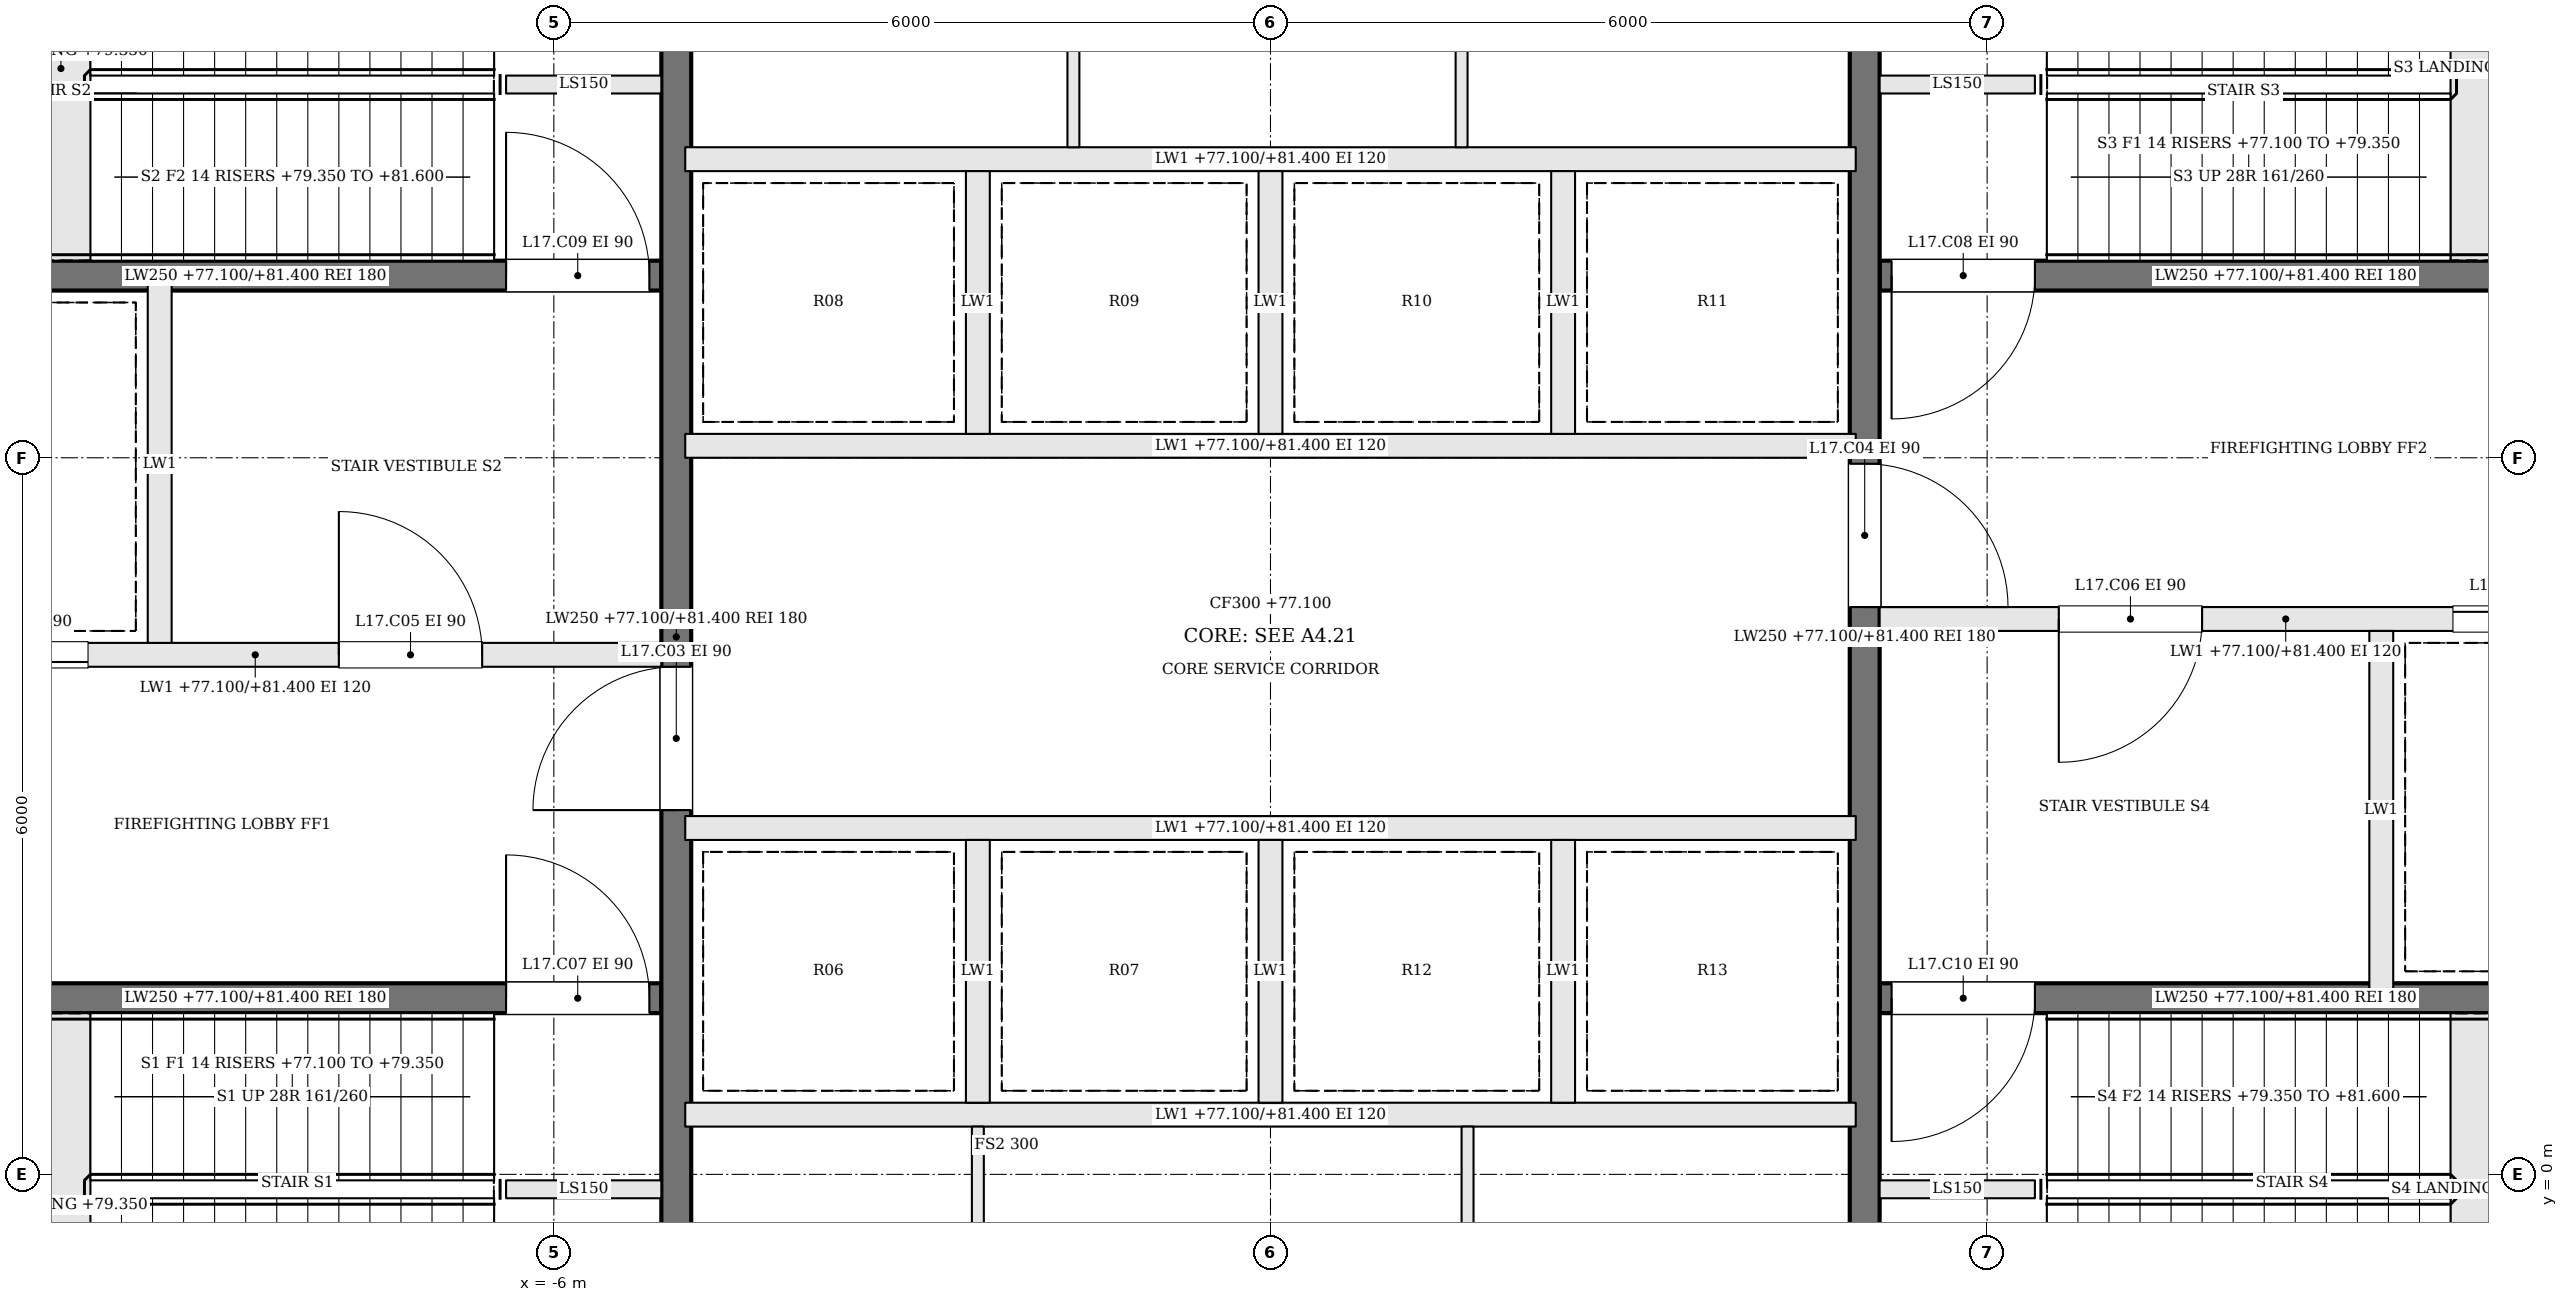
"""IFC4 building model, lengths in metres.
Left out: names, types, materials, properties, quantities, classifications, styles, units other than length and angle.
Written with IfcOpenShell. Run it as: python <this file> out.ifc"""

import sys

from ifc_helpers import new_model, si_unit, direction, frame, frame_2d, origin, place, context, subcontext, project, spatial, rectangle, extrude, element, fill, save


model = new_model("IFC4")
c1 = context("Model", 3, precision=1e-05, world=origin(), true_north=direction((0.0, 1.0)))
c2 = subcontext(c1, "Body", "Model", "MODEL_VIEW")
j1 = project(units=[si_unit("LENGTHUNIT", "METRE"), si_unit("PLANEANGLEUNIT", "RADIAN")], contexts=[c1])
p1 = place(None, origin())
s1 = spatial("IfcSite", under=j1, at=p1, CompositionType="ELEMENT")
p2 = place(p1, origin())
s2 = spatial("IfcBuilding", under=s1, at=p2, CompositionType="ELEMENT")
p3 = place(p2, frame((0.0, 0.0, 77.1)))
s3 = spatial("IfcBuildingStorey", under=s2, at=p3, CompositionType="ELEMENT", Elevation=77.1)
for number, where, z_axis, x_axis in (
    (1, (-6.4, -0.125, 0.0), (0.0, 0.0, 1.0), (1.0, 0.0, 0.0)),
    (2, (6.4, 9.125, 0.0), (0.0, 0.0, 1.0), (-1.0, 0.0, 0.0)),
    (3, (-6.4, 9.125, 0.0), (0.0, 0.0, 1.0), (1.0, 0.0, 0.0)),
    (4, (6.4, -0.125, 0.0), (0.0, 0.0, 1.0), (-1.0, 0.0, 0.0)),
):
    element("IfcWall", number, at=place(p3, frame(where, z_axis=z_axis, x_axis=x_axis)), inside=s3, PredefinedType="SOLIDWALL", context=c2, shape_type="SweptSolid", body=[
        extrude(rectangle(XDim=1.3, YDim=0.15, at=frame_2d((0.65, 0.0))), origin(), (0.0, 0.0, 1.0), 4.3),
    ])
p4 = place(p3, frame((-11.9, 1.475, 0.0), z_axis=(0.0, 0.0, 1.0), x_axis=(1.0, 0.0, 0.0)))
e5 = element("IfcWall", 5, at=p4, inside=s3, PredefinedType="SOLIDWALL", context=c2, shape_type="SweptSolid", body=[
    extrude(rectangle(XDim=6.8, YDim=0.25, at=frame_2d((3.4, 0.0))), origin(), (0.0, 0.0, 1.0), 4.3),
])
p5 = place(p4, frame((5.5, 0.0, 0.0)))
e6 = element("IfcOpeningElement", 6, at=p5, cuts=e5, PredefinedType="OPENING", context=c2, shape_type="SweptSolid", body=[
    extrude(rectangle(XDim=1.2, YDim=2.1, at=frame_2d((0.6, 1.05))), frame((0.0, 0.135, 0.0), z_axis=(0.0, -1.0, 0.0), x_axis=(1.0, 0.0, 0.0)), (0.0, 0.0, 1.0), 0.27),
])
p6 = place(p3, frame((11.9, 7.525, 0.0), z_axis=(0.0, 0.0, 1.0), x_axis=(-1.0, 0.0, 0.0)))
e7 = element("IfcWall", 7, at=p6, inside=s3, PredefinedType="SOLIDWALL", context=c2, shape_type="SweptSolid", body=[
    extrude(rectangle(XDim=6.8, YDim=0.25, at=frame_2d((3.4, 0.0))), origin(), (0.0, 0.0, 1.0), 4.3),
])
p7 = place(p6, frame((5.5, 0.0, 0.0)))
e8 = element("IfcOpeningElement", 8, at=p7, cuts=e7, PredefinedType="OPENING", context=c2, shape_type="SweptSolid", body=[
    extrude(rectangle(XDim=1.2, YDim=2.1, at=frame_2d((0.6, 1.05))), frame((0.0, 0.135, 0.0), z_axis=(0.0, -1.0, 0.0), x_axis=(1.0, 0.0, 0.0)), (0.0, 0.0, 1.0), 0.27),
])
p8 = place(p3, frame((-11.9, 4.35, 0.0), z_axis=(0.0, 0.0, 1.0), x_axis=(1.0, 0.0, 0.0)))
e9 = element("IfcWall", 9, at=p8, inside=s3, PredefinedType="SOLIDWALL", context=c2, shape_type="SweptSolid", body=[
    extrude(rectangle(XDim=6.8, YDim=0.2, at=frame_2d((3.4, 0.0))), origin(), (0.0, 0.0, 1.0), 4.3),
])
p9 = place(p8, frame((4.1, 0.0, 0.0)))
e10 = element("IfcOpeningElement", 10, at=p9, cuts=e9, PredefinedType="OPENING", context=c2, shape_type="SweptSolid", body=[
    extrude(rectangle(XDim=1.2, YDim=2.1, at=frame_2d((0.6, 1.05))), frame((0.0, 0.11, 0.0), z_axis=(0.0, -1.0, 0.0), x_axis=(1.0, 0.0, 0.0)), (0.0, 0.0, 1.0), 0.22),
])
p10 = place(p8, frame((0.8, 0.0, 0.0)))
e11 = element("IfcOpeningElement", 11, at=p10, cuts=e9, PredefinedType="OPENING", context=c2, shape_type="SweptSolid", body=[
    extrude(rectangle(XDim=1.2, YDim=2.1, at=frame_2d((0.6, 1.05))), frame((0.0, 0.11, 0.0), z_axis=(0.0, -1.0, 0.0), x_axis=(1.0, 0.0, 0.0)), (0.0, 0.0, 1.0), 0.22),
])
p11 = place(p3, frame((11.9, 4.65, 0.0), z_axis=(0.0, 0.0, 1.0), x_axis=(-1.0, 0.0, 0.0)))
e12 = element("IfcWall", 12, at=p11, inside=s3, PredefinedType="SOLIDWALL", context=c2, shape_type="SweptSolid", body=[
    extrude(rectangle(XDim=6.8, YDim=0.2, at=frame_2d((3.4, 0.0))), origin(), (0.0, 0.0, 1.0), 4.3),
])
p12 = place(p11, frame((4.1, 0.0, 0.0)))
e13 = element("IfcOpeningElement", 13, at=p12, cuts=e12, PredefinedType="OPENING", context=c2, shape_type="SweptSolid", body=[
    extrude(rectangle(XDim=1.2, YDim=2.1, at=frame_2d((0.6, 1.05))), frame((0.0, 0.11, 0.0), z_axis=(0.0, -1.0, 0.0), x_axis=(1.0, 0.0, 0.0)), (0.0, 0.0, 1.0), 0.22),
])
p13 = place(p11, frame((0.8, 0.0, 0.0)))
e14 = element("IfcOpeningElement", 14, at=p13, cuts=e12, PredefinedType="OPENING", context=c2, shape_type="SweptSolid", body=[
    extrude(rectangle(XDim=1.2, YDim=2.1, at=frame_2d((0.6, 1.05))), frame((0.0, 0.11, 0.0), z_axis=(0.0, -1.0, 0.0), x_axis=(1.0, 0.0, 0.0)), (0.0, 0.0, 1.0), 0.22),
])
p14 = place(p3, frame((-11.9, 7.525, 0.0), z_axis=(0.0, 0.0, 1.0), x_axis=(1.0, 0.0, 0.0)))
e15 = element("IfcWall", 15, at=p14, inside=s3, PredefinedType="SOLIDWALL", context=c2, shape_type="SweptSolid", body=[
    extrude(rectangle(XDim=6.8, YDim=0.25, at=frame_2d((3.4, 0.0))), origin(), (0.0, 0.0, 1.0), 4.3),
])
p15 = place(p14, frame((5.5, 0.0, 0.0)))
e16 = element("IfcOpeningElement", 16, at=p15, cuts=e15, PredefinedType="OPENING", context=c2, shape_type="SweptSolid", body=[
    extrude(rectangle(XDim=1.2, YDim=2.1, at=frame_2d((0.6, 1.05))), frame((0.0, 0.135, 0.0), z_axis=(0.0, -1.0, 0.0), x_axis=(1.0, 0.0, 0.0)), (0.0, 0.0, 1.0), 0.27),
])
p16 = place(p3, frame((11.9, 1.475, 0.0), z_axis=(0.0, 0.0, 1.0), x_axis=(-1.0, 0.0, 0.0)))
e17 = element("IfcWall", 17, at=p16, inside=s3, PredefinedType="SOLIDWALL", context=c2, shape_type="SweptSolid", body=[
    extrude(rectangle(XDim=6.8, YDim=0.25, at=frame_2d((3.4, 0.0))), origin(), (0.0, 0.0, 1.0), 4.3),
])
p17 = place(p16, frame((5.5, 0.0, 0.0)))
e18 = element("IfcOpeningElement", 18, at=p17, cuts=e17, PredefinedType="OPENING", context=c2, shape_type="SweptSolid", body=[
    extrude(rectangle(XDim=1.2, YDim=2.1, at=frame_2d((0.6, 1.05))), frame((0.0, 0.135, 0.0), z_axis=(0.0, -1.0, 0.0), x_axis=(1.0, 0.0, 0.0)), (0.0, 0.0, 1.0), 0.27),
])
for number, where, z_axis, x_axis in (
    (19, (-9.3, 4.45, 0.0), (0.0, 0.0, 1.0), (0.0, 1.0, 0.0)),
    (20, (9.3, 4.55, 0.0), (0.0, 0.0, 1.0), (0.0, -1.0, 0.0)),
):
    element("IfcWall", number, at=place(p3, frame(where, z_axis=z_axis, x_axis=x_axis)), inside=s3, PredefinedType="SOLIDWALL", context=c2, shape_type="SweptSolid", body=[
        extrude(rectangle(XDim=3.0, YDim=0.2, at=frame_2d((1.5, 0.0))), origin(), (0.0, 0.0, 1.0), 4.3),
    ])
p18 = place(p3, frame((-4.975, -1.9, 0.0), z_axis=(0.0, 0.0, 1.0), x_axis=(0.0, 1.0, 0.0)))
e21 = element("IfcWall", 21, at=p18, inside=s3, PredefinedType="SOLIDWALL", context=c2, shape_type="SweptSolid", body=[
    extrude(rectangle(XDim=12.8, YDim=0.25, at=frame_2d((6.4, 0.0))), origin(), (0.0, 0.0, 1.0), 4.3),
])
p19 = place(p18, frame((4.95, 0.0, 0.0)))
e22 = element("IfcOpeningElement", 22, at=p19, cuts=e21, PredefinedType="OPENING", context=c2, shape_type="SweptSolid", body=[
    extrude(rectangle(XDim=1.2, YDim=2.1, at=frame_2d((0.6, 1.05))), frame((0.0, 0.135, 0.0), z_axis=(0.0, -1.0, 0.0), x_axis=(1.0, 0.0, 0.0)), (0.0, 0.0, 1.0), 0.27),
])
p20 = place(p3, frame((4.975, 10.9, 0.0), z_axis=(0.0, 0.0, 1.0), x_axis=(0.0, -1.0, 0.0)))
e23 = element("IfcWall", 23, at=p20, inside=s3, PredefinedType="SOLIDWALL", context=c2, shape_type="SweptSolid", body=[
    extrude(rectangle(XDim=12.8, YDim=0.25, at=frame_2d((6.4, 0.0))), origin(), (0.0, 0.0, 1.0), 4.3),
])
p21 = place(p20, frame((4.95, 0.0, 0.0)))
e24 = element("IfcOpeningElement", 24, at=p21, cuts=e23, PredefinedType="OPENING", context=c2, shape_type="SweptSolid", body=[
    extrude(rectangle(XDim=1.2, YDim=2.1, at=frame_2d((0.6, 1.05))), frame((0.0, 0.135, 0.0), z_axis=(0.0, -1.0, 0.0), x_axis=(1.0, 0.0, 0.0)), (0.0, 0.0, 1.0), 0.27),
])
for number, where, z_axis, x_axis in (
    (25, (-4.9, 0.5, 0.0), (0.0, 0.0, 1.0), (1.0, 0.0, 0.0)),
    (26, (-4.9, 2.9, 0.0), (0.0, 0.0, 1.0), (1.0, 0.0, 0.0)),
    (27, (-4.9, 6.1, 0.0), (0.0, 0.0, 1.0), (1.0, 0.0, 0.0)),
    (28, (-4.9, 8.5, 0.0), (0.0, 0.0, 1.0), (1.0, 0.0, 0.0)),
):
    element("IfcWall", number, at=place(p3, frame(where, z_axis=z_axis, x_axis=x_axis)), inside=s3, PredefinedType="SOLIDWALL", context=c2, shape_type="SweptSolid", body=[
        extrude(rectangle(XDim=9.8, YDim=0.2, at=frame_2d((4.9, 0.0))), origin(), (0.0, 0.0, 1.0), 4.3),
    ])
for number, where, z_axis, x_axis in (
    (29, (-2.45, 0.6, 0.0), (0.0, 0.0, 1.0), (0.0, 1.0, 0.0)),
    (30, (0.0, 0.6, 0.0), (0.0, 0.0, 1.0), (0.0, 1.0, 0.0)),
    (31, (2.45, 0.6, 0.0), (0.0, 0.0, 1.0), (0.0, 1.0, 0.0)),
    (32, (-2.45, 6.2, 0.0), (0.0, 0.0, 1.0), (0.0, 1.0, 0.0)),
    (33, (0.0, 6.2, 0.0), (0.0, 0.0, 1.0), (0.0, 1.0, 0.0)),
    (34, (2.45, 6.2, 0.0), (0.0, 0.0, 1.0), (0.0, 1.0, 0.0)),
):
    element("IfcWall", number, at=place(p3, frame(where, z_axis=z_axis, x_axis=x_axis)), inside=s3, PredefinedType="SOLIDWALL", context=c2, shape_type="SweptSolid", body=[
        extrude(rectangle(XDim=2.2, YDim=0.2, at=frame_2d((1.1, 0.0))), origin(), (0.0, 0.0, 1.0), 4.3),
    ])
for number, where, z_axis, x_axis in (
    (35, (-2.45, -1.9, 0.0), (0.0, 0.0, 1.0), (0.0, 1.0, 0.0)),
    (36, (1.65, -1.9, 0.0), (0.0, 0.0, 1.0), (0.0, 1.0, 0.0)),
    (37, (-1.65, 8.6, 0.0), (0.0, 0.0, 1.0), (0.0, 1.0, 0.0)),
    (38, (1.6, 8.6, 0.0), (0.0, 0.0, 1.0), (0.0, 1.0, 0.0)),
):
    element("IfcWall", number, at=place(p3, frame(where, z_axis=z_axis, x_axis=x_axis)), inside=s3, PredefinedType="PARTITIONING", context=c2, shape_type="SweptSolid", body=[
        extrude(rectangle(XDim=2.3, YDim=0.1, at=frame_2d((1.15, 0.0))), origin(), (0.0, 0.0, 1.0), 4.3),
    ])
p22 = place(p19, origin())
e39 = element("IfcDoor", 39, at=p22, inside=s3, OperationType="SINGLE_SWING_LEFT", PredefinedType="DOOR", context=c2, shape_type="SweptSolid", body=[
    extrude(rectangle(XDim=1.2, YDim=2.1, at=frame_2d((0.6, 1.05))), frame((0.0, 0.025, 0.0), z_axis=(0.0, -1.0, 0.0), x_axis=(1.0, 0.0, 0.0)), (0.0, 0.0, 1.0), 0.05),
])
fill(e22, e39)
p23 = place(p21, origin())
e40 = element("IfcDoor", 40, at=p23, inside=s3, OperationType="SINGLE_SWING_RIGHT", PredefinedType="DOOR", context=c2, shape_type="SweptSolid", body=[
    extrude(rectangle(XDim=1.2, YDim=2.1, at=frame_2d((0.6, 1.05))), frame((0.0, 0.025, 0.0), z_axis=(0.0, -1.0, 0.0), x_axis=(1.0, 0.0, 0.0)), (0.0, 0.0, 1.0), 0.05),
])
fill(e24, e40)
p24 = place(p9, origin())
e41 = element("IfcDoor", 41, at=p24, inside=s3, OperationType="SINGLE_SWING_LEFT", PredefinedType="DOOR", context=c2, shape_type="SweptSolid", body=[
    extrude(rectangle(XDim=1.2, YDim=2.1, at=frame_2d((0.6, 1.05))), frame((0.0, 0.025, 0.0), z_axis=(0.0, -1.0, 0.0), x_axis=(1.0, 0.0, 0.0)), (0.0, 0.0, 1.0), 0.05),
])
fill(e10, e41)
p25 = place(p12, origin())
e42 = element("IfcDoor", 42, at=p25, inside=s3, OperationType="SINGLE_SWING_RIGHT", PredefinedType="DOOR", context=c2, shape_type="SweptSolid", body=[
    extrude(rectangle(XDim=1.2, YDim=2.1, at=frame_2d((0.6, 1.05))), frame((0.0, 0.025, 0.0), z_axis=(0.0, -1.0, 0.0), x_axis=(1.0, 0.0, 0.0)), (0.0, 0.0, 1.0), 0.05),
])
fill(e13, e42)
p26 = place(p5, origin())
e43 = element("IfcDoor", 43, at=p26, inside=s3, OperationType="SINGLE_SWING_LEFT", PredefinedType="DOOR", context=c2, shape_type="SweptSolid", body=[
    extrude(rectangle(XDim=1.2, YDim=2.1, at=frame_2d((0.6, 1.05))), frame((0.0, 0.025, 0.0), z_axis=(0.0, -1.0, 0.0), x_axis=(1.0, 0.0, 0.0)), (0.0, 0.0, 1.0), 0.05),
])
fill(e6, e43)
p27 = place(p7, origin())
e44 = element("IfcDoor", 44, at=p27, inside=s3, OperationType="SINGLE_SWING_RIGHT", PredefinedType="DOOR", context=c2, shape_type="SweptSolid", body=[
    extrude(rectangle(XDim=1.2, YDim=2.1, at=frame_2d((0.6, 1.05))), frame((0.0, 0.025, 0.0), z_axis=(0.0, -1.0, 0.0), x_axis=(1.0, 0.0, 0.0)), (0.0, 0.0, 1.0), 0.05),
])
fill(e8, e44)
p28 = place(p15, origin())
e45 = element("IfcDoor", 45, at=p28, inside=s3, OperationType="SINGLE_SWING_LEFT", PredefinedType="DOOR", context=c2, shape_type="SweptSolid", body=[
    extrude(rectangle(XDim=1.2, YDim=2.1, at=frame_2d((0.6, 1.05))), frame((0.0, 0.025, 0.0), z_axis=(0.0, -1.0, 0.0), x_axis=(1.0, 0.0, 0.0)), (0.0, 0.0, 1.0), 0.05),
])
fill(e16, e45)
p29 = place(p17, origin())
e46 = element("IfcDoor", 46, at=p29, inside=s3, OperationType="SINGLE_SWING_RIGHT", PredefinedType="DOOR", context=c2, shape_type="SweptSolid", body=[
    extrude(rectangle(XDim=1.2, YDim=2.1, at=frame_2d((0.6, 1.05))), frame((0.0, 0.025, 0.0), z_axis=(0.0, -1.0, 0.0), x_axis=(1.0, 0.0, 0.0)), (0.0, 0.0, 1.0), 0.05),
])
fill(e18, e46)
p30 = place(p10, origin())
e47 = element("IfcDoor", 47, at=p30, inside=s3, OperationType="SLIDING_TO_RIGHT", PredefinedType="DOOR", context=c2, shape_type="SweptSolid", body=[
    extrude(rectangle(XDim=1.2, YDim=2.1, at=frame_2d((0.6, 1.05))), frame((0.0, 0.025, 0.0), z_axis=(0.0, -1.0, 0.0), x_axis=(1.0, 0.0, 0.0)), (0.0, 0.0, 1.0), 0.05),
])
fill(e11, e47)
p31 = place(p13, origin())
e48 = element("IfcDoor", 48, at=p31, inside=s3, OperationType="SLIDING_TO_RIGHT", PredefinedType="DOOR", context=c2, shape_type="SweptSolid", body=[
    extrude(rectangle(XDim=1.2, YDim=2.1, at=frame_2d((0.6, 1.05))), frame((0.0, 0.025, 0.0), z_axis=(0.0, -1.0, 0.0), x_axis=(1.0, 0.0, 0.0)), (0.0, 0.0, 1.0), 0.05),
])
fill(e14, e48)
save(model, sys.argv[1])
